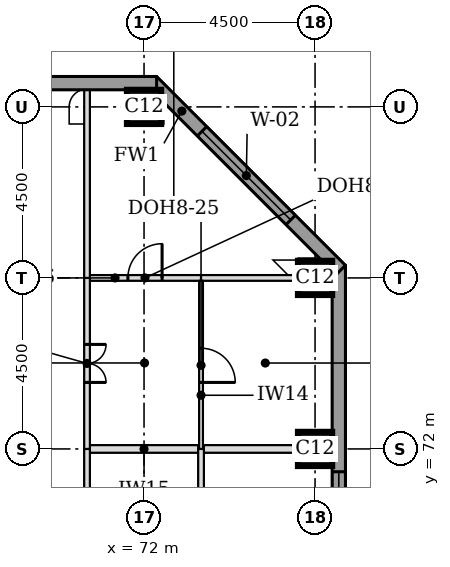
"""IFC4 building model, lengths in metres.
Left out: names, types, materials, properties, quantities, classifications, styles, units other than length and angle.
Written with IfcOpenShell. Run it as: python <this file> out.ifc"""

import sys

from ifc_helpers import new_model, si_unit, direction, frame, frame_2d, origin, origin_2d, place, context, subcontext, project, spatial, rectangle, extrude, element, fill, save


model = new_model("IFC4")
c1 = context("Model", 3, precision=1e-05, world=origin(), true_north=direction((0.0, 1.0)))
c2 = subcontext(c1, "Body", "Model", "MODEL_VIEW")
j1 = project(units=[si_unit("LENGTHUNIT", "METRE"), si_unit("PLANEANGLEUNIT", "RADIAN")], contexts=[c1])
p1 = place(None, origin())
s1 = spatial("IfcSite", under=j1, at=p1, CompositionType="ELEMENT")
p2 = place(p1, origin())
s2 = spatial("IfcBuilding", under=s1, at=p2, CompositionType="ELEMENT")
p3 = place(p2, frame((0.0, 0.0, 203.2)))
s3 = spatial("IfcBuildingStorey", under=s2, at=p3, CompositionType="ELEMENT", Elevation=203.2)
for number, where, z_axis, x_axis in (
    (1, (76.5, 72.0, 0.0), (0.0, 0.0, 1.0), (1.0, 0.0, 0.0)),
    (2, (76.5, 76.5, 0.0), (0.0, 0.0, 1.0), (1.0, 0.0, 0.0)),
    (3, (72.0, 81.0, 0.0), (0.0, 0.0, 1.0), (1.0, 0.0, 0.0)),
):
    element("IfcColumn", number, at=place(p3, frame(where, z_axis=z_axis, x_axis=x_axis)), inside=s3, PredefinedType="COLUMN", context=c2, shape_type="SweptSolid", body=[
        extrude(rectangle(XDim=0.9, YDim=0.9, at=origin_2d()), origin(), (0.0, 0.0, 1.0), 3.7),
    ])
p4 = place(p3, frame((77.125, 44.669, 0.0), z_axis=(0.0, 0.0, 1.0), x_axis=(0.0, 1.0, 0.0)))
e4 = element("IfcWall", 4, at=p4, inside=s3, PredefinedType="STANDARD", context=c2, shape_type="SweptSolid", body=[
    extrude(rectangle(XDim=32.163, YDim=0.35, at=frame_2d((16.081, 0.0))), origin(), (0.0, 0.0, 1.0), 3.525),
])
p5 = place(p4, frame((5.431, 0.0, 0.9)))
e5 = element("IfcOpeningElement", 5, at=p5, cuts=e4, PredefinedType="OPENING", context=c2, shape_type="SweptSolid", body=[
    extrude(rectangle(XDim=3.3, YDim=1.9, at=frame_2d((1.65, 0.95))), frame((0.0, 0.185, 0.0), z_axis=(0.0, -1.0, 0.0), x_axis=(1.0, 0.0, 0.0)), (0.0, 0.0, 1.0), 0.37),
])
p6 = place(p4, frame((9.931, 0.0, 0.9)))
e6 = element("IfcOpeningElement", 6, at=p6, cuts=e4, PredefinedType="OPENING", context=c2, shape_type="SweptSolid", body=[
    extrude(rectangle(XDim=3.3, YDim=1.9, at=frame_2d((1.65, 0.95))), frame((0.0, 0.185, 0.0), z_axis=(0.0, -1.0, 0.0), x_axis=(1.0, 0.0, 0.0)), (0.0, 0.0, 1.0), 0.37),
])
p7 = place(p4, frame((14.431, 0.0, 0.9)))
e7 = element("IfcOpeningElement", 7, at=p7, cuts=e4, PredefinedType="OPENING", context=c2, shape_type="SweptSolid", body=[
    extrude(rectangle(XDim=3.3, YDim=1.9, at=frame_2d((1.65, 0.95))), frame((0.0, 0.185, 0.0), z_axis=(0.0, -1.0, 0.0), x_axis=(1.0, 0.0, 0.0)), (0.0, 0.0, 1.0), 0.37),
])
p8 = place(p4, frame((18.931, 0.0, 0.9)))
e8 = element("IfcOpeningElement", 8, at=p8, cuts=e4, PredefinedType="OPENING", context=c2, shape_type="SweptSolid", body=[
    extrude(rectangle(XDim=3.3, YDim=1.9, at=frame_2d((1.65, 0.95))), frame((0.0, 0.185, 0.0), z_axis=(0.0, -1.0, 0.0), x_axis=(1.0, 0.0, 0.0)), (0.0, 0.0, 1.0), 0.37),
])
p9 = place(p4, frame((23.431, 0.0, 0.9)))
e9 = element("IfcOpeningElement", 9, at=p9, cuts=e4, PredefinedType="OPENING", context=c2, shape_type="SweptSolid", body=[
    extrude(rectangle(XDim=3.3, YDim=1.9, at=frame_2d((1.65, 0.95))), frame((0.0, 0.185, 0.0), z_axis=(0.0, -1.0, 0.0), x_axis=(1.0, 0.0, 0.0)), (0.0, 0.0, 1.0), 0.37),
])
p10 = place(p3, frame((77.176, 76.708, 0.0), z_axis=(0.0, 0.0, 1.0), x_axis=(-0.707106781187, 0.707106781187, 0.0)))
e10 = element("IfcWall", 10, at=p10, inside=s3, PredefinedType="STANDARD", context=c2, shape_type="SweptSolid", body=[
    extrude(rectangle(XDim=7.027, YDim=0.35, at=frame_2d((3.513, 0.0))), origin(), (0.0, 0.0, 1.0), 3.525),
])
p11 = place(p10, frame((1.863, 0.0, 0.9)))
e11 = element("IfcOpeningElement", 11, at=p11, cuts=e10, PredefinedType="OPENING", context=c2, shape_type="SweptSolid", body=[
    extrude(rectangle(XDim=3.3, YDim=1.9, at=frame_2d((1.65, 0.95))), frame((0.0, 0.185, 0.0), z_axis=(0.0, -1.0, 0.0), x_axis=(1.0, 0.0, 0.0)), (0.0, 0.0, 1.0), 0.37),
])
p12 = place(p3, frame((72.331, 81.625, 0.0), z_axis=(0.0, 0.0, 1.0), x_axis=(-1.0, 0.0, 0.0)))
e12 = element("IfcWall", 12, at=p12, inside=s3, PredefinedType="STANDARD", context=c2, shape_type="SweptSolid", body=[
    extrude(rectangle(XDim=32.163, YDim=0.35, at=frame_2d((16.081, 0.0))), origin(), (0.0, 0.0, 1.0), 3.525),
])
p13 = place(p12, frame((5.431, 0.0, 0.9)))
e13 = element("IfcOpeningElement", 13, at=p13, cuts=e12, PredefinedType="OPENING", context=c2, shape_type="SweptSolid", body=[
    extrude(rectangle(XDim=3.3, YDim=1.9, at=frame_2d((1.65, 0.95))), frame((0.0, 0.185, 0.0), z_axis=(0.0, -1.0, 0.0), x_axis=(1.0, 0.0, 0.0)), (0.0, 0.0, 1.0), 0.37),
])
p14 = place(p12, frame((9.931, 0.0, 0.9)))
e14 = element("IfcOpeningElement", 14, at=p14, cuts=e12, PredefinedType="OPENING", context=c2, shape_type="SweptSolid", body=[
    extrude(rectangle(XDim=3.3, YDim=1.9, at=frame_2d((1.65, 0.95))), frame((0.0, 0.185, 0.0), z_axis=(0.0, -1.0, 0.0), x_axis=(1.0, 0.0, 0.0)), (0.0, 0.0, 1.0), 0.37),
])
p15 = place(p12, frame((14.431, 0.0, 0.9)))
e15 = element("IfcOpeningElement", 15, at=p15, cuts=e12, PredefinedType="OPENING", context=c2, shape_type="SweptSolid", body=[
    extrude(rectangle(XDim=3.3, YDim=1.9, at=frame_2d((1.65, 0.95))), frame((0.0, 0.185, 0.0), z_axis=(0.0, -1.0, 0.0), x_axis=(1.0, 0.0, 0.0)), (0.0, 0.0, 1.0), 0.37),
])
p16 = place(p12, frame((18.931, 0.0, 0.9)))
e16 = element("IfcOpeningElement", 16, at=p16, cuts=e12, PredefinedType="OPENING", context=c2, shape_type="SweptSolid", body=[
    extrude(rectangle(XDim=3.3, YDim=1.9, at=frame_2d((1.65, 0.95))), frame((0.0, 0.185, 0.0), z_axis=(0.0, -1.0, 0.0), x_axis=(1.0, 0.0, 0.0)), (0.0, 0.0, 1.0), 0.37),
])
p17 = place(p12, frame((23.431, 0.0, 0.9)))
e17 = element("IfcOpeningElement", 17, at=p17, cuts=e12, PredefinedType="OPENING", context=c2, shape_type="SweptSolid", body=[
    extrude(rectangle(XDim=3.3, YDim=1.9, at=frame_2d((1.65, 0.95))), frame((0.0, 0.185, 0.0), z_axis=(0.0, -1.0, 0.0), x_axis=(1.0, 0.0, 0.0)), (0.0, 0.0, 1.0), 0.37),
])
p18 = place(p3, frame((70.575, 72.0, 0.0), z_axis=(0.0, 0.0, 1.0), x_axis=(1.0, 0.0, 0.0)))
e18 = element("IfcWall", 18, at=p18, inside=s3, PredefinedType="PARTITIONING", context=c2, shape_type="SweptSolid", body=[
    extrude(rectangle(XDim=2.85, YDim=0.2, at=frame_2d((1.425, 0.0))), origin(), (0.0, 0.0, 1.0), 3.55),
])
p19 = place(p3, frame((73.575, 72.0, 0.0), z_axis=(0.0, 0.0, 1.0), x_axis=(1.0, 0.0, 0.0)))
e19 = element("IfcWall", 19, at=p19, inside=s3, PredefinedType="PARTITIONING", context=c2, shape_type="SweptSolid", body=[
    extrude(rectangle(XDim=3.375, YDim=0.2, at=frame_2d((1.688, 0.0))), origin(), (0.0, 0.0, 1.0), 3.55),
])
p20 = place(p3, frame((70.575, 76.5, 0.0), z_axis=(0.0, 0.0, 1.0), x_axis=(1.0, 0.0, 0.0)))
e20 = element("IfcWall", 20, at=p20, inside=s3, PredefinedType="PARTITIONING", context=c2, shape_type="SweptSolid", body=[
    extrude(rectangle(XDim=2.925, YDim=0.15, at=frame_2d((1.462, 0.0))), origin(), (0.0, 0.0, 1.0), 2.948),
])
p21 = place(p20, frame((1.0, 0.0, 0.0)))
e21 = element("IfcOpeningElement", 21, at=p21, cuts=e20, PredefinedType="OPENING", context=c2, shape_type="SweptSolid", body=[
    extrude(rectangle(XDim=0.9, YDim=2.1, at=frame_2d((0.45, 1.05))), frame((0.0, 0.085, 0.0), z_axis=(0.0, -1.0, 0.0), x_axis=(1.0, 0.0, 0.0)), (0.0, 0.0, 1.0), 0.17),
])
p22 = place(p3, frame((73.5, 76.5, 0.0), z_axis=(0.0, 0.0, 1.0), x_axis=(1.0, 0.0, 0.0)))
e22 = element("IfcWall", 22, at=p22, inside=s3, PredefinedType="PARTITIONING", context=c2, shape_type="SweptSolid", body=[
    extrude(rectangle(XDim=2.55, YDim=0.15, at=frame_2d((1.275, 0.0))), origin(), (0.0, 0.0, 1.0), 2.948),
])
for number, where, z_axis, x_axis in (
    (23, (70.5, 69.0, 0.0), (0.0, 0.0, 1.0), (0.0, 1.0, 0.0)),
    (24, (73.5, 69.0, 0.0), (0.0, 0.0, 1.0), (0.0, 1.0, 0.0)),
):
    element("IfcWall", number, at=place(p3, frame(where, z_axis=z_axis, x_axis=x_axis)), inside=s3, PredefinedType="PARTITIONING", context=c2, shape_type="SweptSolid", body=[
        extrude(rectangle(XDim=3.0, YDim=0.15, at=frame_2d((1.5, 0.0))), origin(), (0.0, 0.0, 1.0), 3.55),
    ])
p23 = place(p3, frame((70.5, 72.0, 0.0), z_axis=(0.0, 0.0, 1.0), x_axis=(0.0, 1.0, 0.0)))
e25 = element("IfcWall", 25, at=p23, inside=s3, PredefinedType="PARTITIONING", context=c2, shape_type="SweptSolid", body=[
    extrude(rectangle(XDim=4.5, YDim=0.15, at=frame_2d((2.25, 0.0))), origin(), (0.0, 0.0, 1.0), 3.55),
])
p24 = place(p23, frame((1.75, 0.0, 0.0)))
e26 = element("IfcOpeningElement", 26, at=p24, cuts=e25, PredefinedType="OPENING", context=c2, shape_type="SweptSolid", body=[
    extrude(rectangle(XDim=1.0, YDim=2.1, at=frame_2d((0.5, 1.05))), frame((0.0, 0.085, 0.0), z_axis=(0.0, -1.0, 0.0), x_axis=(1.0, 0.0, 0.0)), (0.0, 0.0, 1.0), 0.17),
])
p25 = place(p3, frame((73.5, 72.0, 0.0), z_axis=(0.0, 0.0, 1.0), x_axis=(0.0, 1.0, 0.0)))
e27 = element("IfcWall", 27, at=p25, inside=s3, PredefinedType="PARTITIONING", context=c2, shape_type="SweptSolid", body=[
    extrude(rectangle(XDim=4.425, YDim=0.1, at=frame_2d((2.212, 0.0))), origin(), (0.0, 0.0, 1.0), 3.55),
])
p26 = place(p25, frame((1.75, 0.0, 0.0)))
e28 = element("IfcOpeningElement", 28, at=p26, cuts=e27, PredefinedType="OPENING", context=c2, shape_type="SweptSolid", body=[
    extrude(rectangle(XDim=0.9, YDim=2.1, at=frame_2d((0.45, 1.05))), frame((0.0, 0.06, 0.0), z_axis=(0.0, -1.0, 0.0), x_axis=(1.0, 0.0, 0.0)), (0.0, 0.0, 1.0), 0.12),
])
p27 = place(p3, frame((70.5, 76.5, 0.0), z_axis=(0.0, 0.0, 1.0), x_axis=(0.0, 1.0, 0.0)))
e29 = element("IfcWall", 29, at=p27, inside=s3, PredefinedType="PARTITIONING", context=c2, shape_type="SweptSolid", body=[
    extrude(rectangle(XDim=4.95, YDim=0.15, at=frame_2d((2.475, 0.0))), origin(), (0.0, 0.0, 1.0), 3.55),
])
p28 = place(p9, origin())
e30 = element("IfcWindow", 30, at=p28, inside=s3, PartitioningType="SINGLE_PANEL", PredefinedType="WINDOW", context=c2, shape_type="SweptSolid", body=[
    extrude(rectangle(XDim=3.3, YDim=1.9, at=frame_2d((1.65, 0.95))), frame((0.0, 0.085, 0.0), z_axis=(0.0, -1.0, 0.0), x_axis=(1.0, 0.0, 0.0)), (0.0, 0.0, 1.0), 0.06),
])
fill(e9, e30)
p29 = place(p11, origin())
e31 = element("IfcWindow", 31, at=p29, inside=s3, PartitioningType="SINGLE_PANEL", PredefinedType="WINDOW", context=c2, shape_type="SweptSolid", body=[
    extrude(rectangle(XDim=3.3, YDim=1.9, at=frame_2d((1.65, 0.95))), frame((0.0, 0.085, 0.0), z_axis=(0.0, -1.0, 0.0), x_axis=(1.0, 0.0, 0.0)), (0.0, 0.0, 1.0), 0.06),
])
fill(e11, e31)
p30 = place(p24, frame((1.0, 0.0, 0.0), z_axis=(0.0, 0.0, 1.0), x_axis=(-1.0, 0.0, 0.0)))
e32 = element("IfcDoor", 32, at=p30, inside=s3, OperationType="DOUBLE_DOOR_SINGLE_SWING", PredefinedType="DOOR", context=c2, shape_type="SweptSolid", body=[
    extrude(rectangle(XDim=1.0, YDim=2.1, at=frame_2d((0.5, 1.05))), frame((0.0, 0.025, 0.0), z_axis=(0.0, -1.0, 0.0), x_axis=(1.0, 0.0, 0.0)), (0.0, 0.0, 1.0), 0.05),
])
fill(e26, e32)
p31 = place(p26, frame((0.9, 0.0, 0.0), z_axis=(0.0, 0.0, 1.0), x_axis=(-1.0, 0.0, 0.0)))
e33 = element("IfcDoor", 33, at=p31, inside=s3, OperationType="SINGLE_SWING_RIGHT", PredefinedType="DOOR", context=c2, shape_type="SweptSolid", body=[
    extrude(rectangle(XDim=0.9, YDim=2.1, at=frame_2d((0.45, 1.05))), frame((0.0, 0.025, 0.0), z_axis=(0.0, -1.0, 0.0), x_axis=(1.0, 0.0, 0.0)), (0.0, 0.0, 1.0), 0.05),
])
fill(e28, e33)
p32 = place(p21, origin())
e34 = element("IfcDoor", 34, at=p32, inside=s3, OperationType="SINGLE_SWING_RIGHT", PredefinedType="DOOR", context=c2, shape_type="SweptSolid", body=[
    extrude(rectangle(XDim=0.9, YDim=2.1, at=frame_2d((0.45, 1.05))), frame((0.0, 0.025, 0.0), z_axis=(0.0, -1.0, 0.0), x_axis=(1.0, 0.0, 0.0)), (0.0, 0.0, 1.0), 0.05),
])
fill(e21, e34)
save(model, sys.argv[1])
